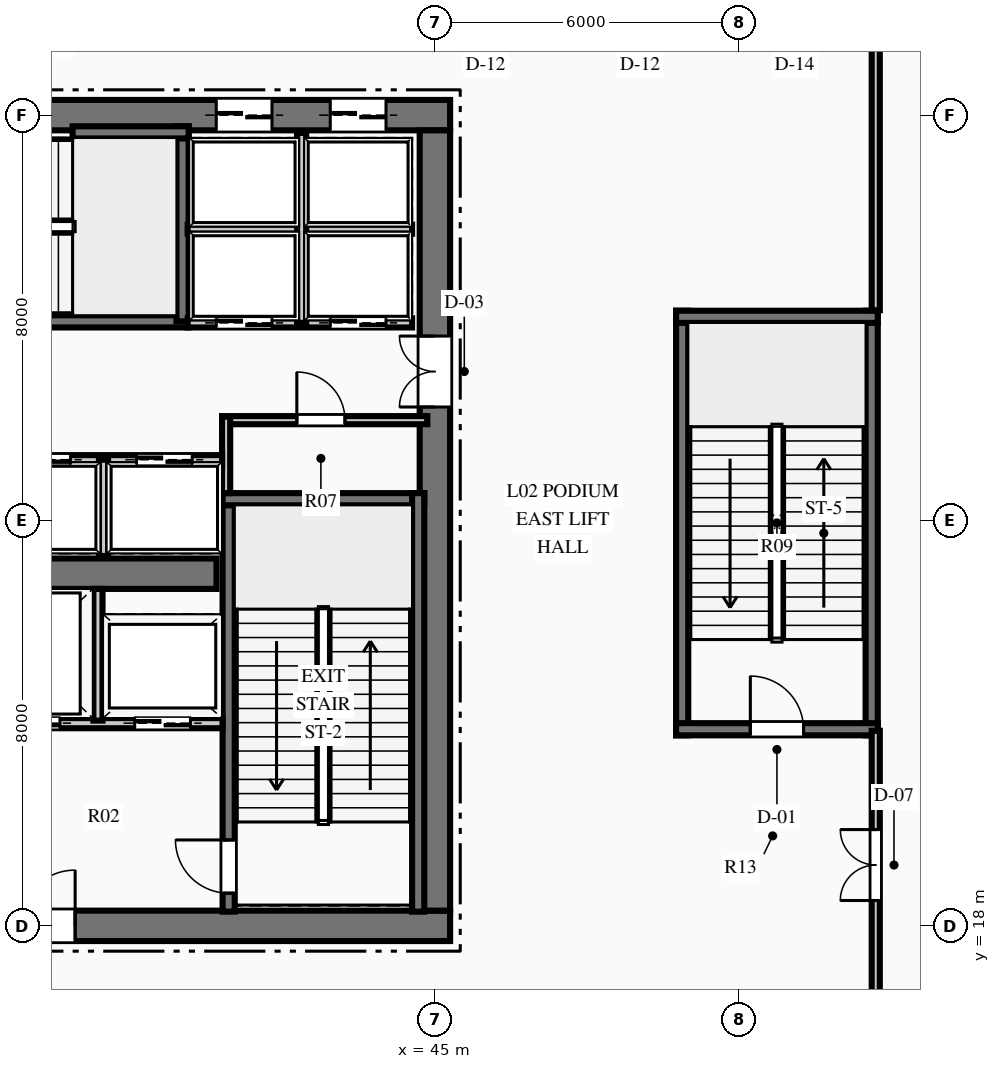
"""IFC4 building model, lengths in metres.
Left out: names, types, materials, properties, quantities, classifications, styles, units other than length and angle.
Written with IfcOpenShell. Run it as: python <this file> out.ifc"""

import sys

from ifc_helpers import new_model, si_unit, direction, frame, frame_2d, origin, place, context, subcontext, project, spatial, rectangle, extrude, element, fill, save


model = new_model("IFC4")
c1 = context("Model", 3, precision=1e-05, world=origin(), true_north=direction((0.0, 1.0)))
c2 = subcontext(c1, "Body", "Model", "MODEL_VIEW")
j1 = project(units=[si_unit("LENGTHUNIT", "METRE"), si_unit("PLANEANGLEUNIT", "RADIAN")], contexts=[c1])
p1 = place(None, origin())
s1 = spatial("IfcSite", under=j1, at=p1, CompositionType="ELEMENT")
p2 = place(p1, origin())
s2 = spatial("IfcBuilding", under=s1, at=p2, CompositionType="ELEMENT")
p3 = place(p2, frame((0.0, 0.0, 11.4)))
s3 = spatial("IfcBuildingStorey", under=s2, at=p3, CompositionType="ELEMENT", Elevation=11.4)
p4 = place(p3, frame((26.7, 18.0, 0.0), z_axis=(0.0, 0.0, 1.0), x_axis=(1.0, 0.0, 0.0)))
e1 = element("IfcWall", 1, at=p4, inside=s3, PredefinedType="SHEAR", context=c2, shape_type="SweptSolid", body=[
    extrude(rectangle(XDim=18.6, YDim=0.6, at=frame_2d((9.3, 0.0))), origin(), (0.0, 0.0, 1.0), 5.4),
])
p5 = place(p4, frame((7.4, 0.0, 0.0)))
e2 = element("IfcOpeningElement", 2, at=p5, cuts=e1, PredefinedType="OPENING", context=c2, shape_type="SweptSolid", body=[
    extrude(rectangle(XDim=1.1, YDim=2.15, at=frame_2d((0.55, 1.075))), frame((0.0, 0.31, 0.0), z_axis=(0.0, -1.0, 0.0), x_axis=(1.0, 0.0, 0.0)), (0.0, 0.0, 1.0), 0.62),
])
p6 = place(p4, frame((10.1, 0.0, 0.0)))
e3 = element("IfcOpeningElement", 3, at=p6, cuts=e1, PredefinedType="OPENING", context=c2, shape_type="SweptSolid", body=[
    extrude(rectangle(XDim=1.1, YDim=2.15, at=frame_2d((0.55, 1.075))), frame((0.0, 0.31, 0.0), z_axis=(0.0, -1.0, 0.0), x_axis=(1.0, 0.0, 0.0)), (0.0, 0.0, 1.0), 0.62),
])
p7 = place(p3, frame((26.7, 34.0, 0.0), z_axis=(0.0, 0.0, 1.0), x_axis=(1.0, 0.0, 0.0)))
e4 = element("IfcWall", 4, at=p7, inside=s3, PredefinedType="SHEAR", context=c2, shape_type="SweptSolid", body=[
    extrude(rectangle(XDim=18.6, YDim=0.6, at=frame_2d((9.3, 0.0))), origin(), (0.0, 0.0, 1.0), 5.4),
])
p8 = place(p7, frame((1.265, 0.0, 0.0)))
e5 = element("IfcOpeningElement", 5, at=p8, cuts=e4, PredefinedType="OPENING", context=c2, shape_type="SweptSolid", body=[
    extrude(rectangle(XDim=1.1, YDim=2.15, at=frame_2d((0.55, 1.075))), frame((0.0, 0.31, 0.0), z_axis=(0.0, -1.0, 0.0), x_axis=(1.0, 0.0, 0.0)), (0.0, 0.0, 1.0), 0.62),
])
p9 = place(p7, frame((3.515, 0.0, 0.0)))
e6 = element("IfcOpeningElement", 6, at=p9, cuts=e4, PredefinedType="OPENING", context=c2, shape_type="SweptSolid", body=[
    extrude(rectangle(XDim=1.1, YDim=2.15, at=frame_2d((0.55, 1.075))), frame((0.0, 0.31, 0.0), z_axis=(0.0, -1.0, 0.0), x_axis=(1.0, 0.0, 0.0)), (0.0, 0.0, 1.0), 0.62),
])
p10 = place(p7, frame((13.985, 0.0, 0.0)))
e7 = element("IfcOpeningElement", 7, at=p10, cuts=e4, PredefinedType="OPENING", context=c2, shape_type="SweptSolid", body=[
    extrude(rectangle(XDim=1.1, YDim=2.15, at=frame_2d((0.55, 1.075))), frame((0.0, 0.31, 0.0), z_axis=(0.0, -1.0, 0.0), x_axis=(1.0, 0.0, 0.0)), (0.0, 0.0, 1.0), 0.62),
])
p11 = place(p7, frame((16.235, 0.0, 0.0)))
e8 = element("IfcOpeningElement", 8, at=p11, cuts=e4, PredefinedType="OPENING", context=c2, shape_type="SweptSolid", body=[
    extrude(rectangle(XDim=1.1, YDim=2.15, at=frame_2d((0.55, 1.075))), frame((0.0, 0.31, 0.0), z_axis=(0.0, -1.0, 0.0), x_axis=(1.0, 0.0, 0.0)), (0.0, 0.0, 1.0), 0.62),
])
p12 = place(p3, frame((45.0, 18.3, 0.0), z_axis=(0.0, 0.0, 1.0), x_axis=(0.0, 1.0, 0.0)))
e9 = element("IfcWall", 9, at=p12, inside=s3, PredefinedType="SHEAR", context=c2, shape_type="SweptSolid", body=[
    extrude(rectangle(XDim=15.4, YDim=0.6, at=frame_2d((7.7, 0.0))), origin(), (0.0, 0.0, 1.0), 5.4),
])
p13 = place(p12, frame((9.94, 0.0, 0.0)))
e10 = element("IfcOpeningElement", 10, at=p13, cuts=e9, PredefinedType="OPENING", context=c2, shape_type="SweptSolid", body=[
    extrude(rectangle(XDim=1.4, YDim=2.2, at=frame_2d((0.7, 1.1))), frame((0.0, 0.31, 0.0), z_axis=(0.0, -1.0, 0.0), x_axis=(1.0, 0.0, 0.0)), (0.0, 0.0, 1.0), 0.62),
])
p14 = place(p3, frame((31.31, 24.95, 0.0), z_axis=(0.0, 0.0, 1.0), x_axis=(1.0, 0.0, 0.0)))
e11 = element("IfcWall", 11, at=p14, inside=s3, PredefinedType="SHEAR", context=c2, shape_type="SweptSolid", body=[
    extrude(rectangle(XDim=9.38, YDim=0.6, at=frame_2d((4.69, 0.0))), origin(), (0.0, 0.0, 1.0), 5.4),
])
p15 = place(p3, frame((40.93, 18.28, 0.0), z_axis=(0.0, 0.0, 1.0), x_axis=(0.0, 1.0, 0.0)))
e12 = element("IfcWall", 12, at=p15, inside=s3, PredefinedType="SHEAR", context=c2, shape_type="SweptSolid", body=[
    extrude(rectangle(XDim=8.26, YDim=0.24, at=frame_2d((4.13, 0.0))), origin(), (0.0, 0.0, 1.0), 5.4),
])
p16 = place(p15, frame((0.365, 0.0, 0.0)))
e13 = element("IfcOpeningElement", 13, at=p16, cuts=e12, PredefinedType="OPENING", context=c2, shape_type="SweptSolid", body=[
    extrude(rectangle(XDim=1.05, YDim=2.15, at=frame_2d((0.525, 1.075))), frame((0.0, 0.13, 0.0), z_axis=(0.0, -1.0, 0.0), x_axis=(1.0, 0.0, 0.0)), (0.0, 0.0, 1.0), 0.26),
])
p17 = place(p3, frame((40.81, 26.42, 0.0), z_axis=(0.0, 0.0, 1.0), x_axis=(1.0, 0.0, 0.0)))
e14 = element("IfcWall", 14, at=p17, inside=s3, PredefinedType="SHEAR", context=c2, shape_type="SweptSolid", body=[
    extrude(rectangle(XDim=3.98, YDim=0.24, at=frame_2d((1.99, 0.0))), origin(), (0.0, 0.0, 1.0), 5.4),
])
p18 = place(p3, frame((44.67, 18.28, 0.0), z_axis=(0.0, 0.0, 1.0), x_axis=(0.0, 1.0, 0.0)))
e15 = element("IfcWall", 15, at=p18, inside=s3, PredefinedType="SHEAR", context=c2, shape_type="SweptSolid", body=[
    extrude(rectangle(XDim=8.26, YDim=0.24, at=frame_2d((4.13, 0.0))), origin(), (0.0, 0.0, 1.0), 5.4),
])
p19 = place(p3, frame((31.76, 29.93, 0.0), z_axis=(0.0, 0.0, 1.0), x_axis=(1.0, 0.0, 0.0)))
e16 = element("IfcWall", 16, at=p19, inside=s3, PredefinedType="SHEAR", context=c2, shape_type="SweptSolid", body=[
    extrude(rectangle(XDim=8.38, YDim=0.24, at=frame_2d((4.19, 0.0))), origin(), (0.0, 0.0, 1.0), 5.4),
])
p20 = place(p19, frame((0.565, 0.0, 0.0)))
e17 = element("IfcOpeningElement", 17, at=p20, cuts=e16, PredefinedType="OPENING", context=c2, shape_type="SweptSolid", body=[
    extrude(rectangle(XDim=1.05, YDim=2.15, at=frame_2d((0.525, 1.075))), frame((0.0, 0.13, 0.0), z_axis=(0.0, -1.0, 0.0), x_axis=(1.0, 0.0, 0.0)), (0.0, 0.0, 1.0), 0.26),
])
p21 = place(p3, frame((40.02, 29.93, 0.0), z_axis=(0.0, 0.0, 1.0), x_axis=(0.0, 1.0, 0.0)))
e18 = element("IfcWall", 18, at=p21, inside=s3, PredefinedType="SHEAR", context=c2, shape_type="SweptSolid", body=[
    extrude(rectangle(XDim=3.85, YDim=0.24, at=frame_2d((1.925, 0.0))), origin(), (0.0, 0.0, 1.0), 5.4),
])
p22 = place(p3, frame((37.85, 33.66, 0.0), z_axis=(0.0, 0.0, 1.0), x_axis=(1.0, 0.0, 0.0)))
e19 = element("IfcWall", 19, at=p22, inside=s3, PredefinedType="SHEAR", context=c2, shape_type="SweptSolid", body=[
    extrude(rectangle(XDim=2.29, YDim=0.24, at=frame_2d((1.145, 0.0))), origin(), (0.0, 0.0, 1.0), 5.4),
])
for number, where, z_axis, x_axis in (
    (20, (49.88, 21.76, 0.0), (0.0, 0.0, 1.0), (0.0, 1.0, 0.0)),
    (21, (53.62, 21.76, 0.0), (0.0, 0.0, 1.0), (0.0, 1.0, 0.0)),
):
    element("IfcWall", number, at=place(p3, frame(where, z_axis=z_axis, x_axis=x_axis)), inside=s3, PredefinedType="SHEAR", context=c2, shape_type="SweptSolid", body=[
        extrude(rectangle(XDim=8.38, YDim=0.24, at=frame_2d((4.19, 0.0))), origin(), (0.0, 0.0, 1.0), 5.4),
    ])
p23 = place(p3, frame((49.76, 21.88, 0.0), z_axis=(0.0, 0.0, 1.0), x_axis=(1.0, 0.0, 0.0)))
e22 = element("IfcWall", 22, at=p23, inside=s3, PredefinedType="SHEAR", context=c2, shape_type="SweptSolid", body=[
    extrude(rectangle(XDim=3.98, YDim=0.24, at=frame_2d((1.99, 0.0))), origin(), (0.0, 0.0, 1.0), 5.4),
])
p24 = place(p23, frame((1.465, 0.0, 0.0)))
e23 = element("IfcOpeningElement", 23, at=p24, cuts=e22, PredefinedType="OPENING", context=c2, shape_type="SweptSolid", body=[
    extrude(rectangle(XDim=1.05, YDim=2.15, at=frame_2d((0.525, 1.075))), frame((0.0, 0.13, 0.0), z_axis=(0.0, -1.0, 0.0), x_axis=(1.0, 0.0, 0.0)), (0.0, 0.0, 1.0), 0.26),
])
p25 = place(p3, frame((49.76, 30.02, 0.0), z_axis=(0.0, 0.0, 1.0), x_axis=(1.0, 0.0, 0.0)))
e24 = element("IfcWall", 24, at=p25, inside=s3, PredefinedType="SHEAR", context=c2, shape_type="SweptSolid", body=[
    extrude(rectangle(XDim=3.98, YDim=0.24, at=frame_2d((1.99, 0.0))), origin(), (0.0, 0.0, 1.0), 5.4),
])
p26 = place(p3, frame((36.12, 22.0, 0.0), z_axis=(0.0, 0.0, 1.0), x_axis=(1.0, 0.0, 0.0)))
e25 = element("IfcWall", 25, at=p26, inside=s3, PredefinedType="PARTITIONING", context=c2, shape_type="SweptSolid", body=[
    extrude(rectangle(XDim=4.69, YDim=0.2, at=frame_2d((2.345, 0.0))), origin(), (0.0, 0.0, 1.0), 5.07),
])
p27 = place(p26, frame((2.955, 0.0, 0.0)))
e26 = element("IfcOpeningElement", 26, at=p27, cuts=e25, PredefinedType="OPENING", context=c2, shape_type="SweptSolid", body=[
    extrude(rectangle(XDim=1.1, YDim=2.15, at=frame_2d((0.55, 1.075))), frame((0.0, 0.11, 0.0), z_axis=(0.0, -1.0, 0.0), x_axis=(1.0, 0.0, 0.0)), (0.0, 0.0, 1.0), 0.22),
])
p28 = place(p26, frame((0.08, 0.0, 0.0)))
e27 = element("IfcOpeningElement", 27, at=p28, cuts=e25, PredefinedType="OPENING", context=c2, shape_type="SweptSolid", body=[
    extrude(rectangle(XDim=1.4, YDim=2.2, at=frame_2d((0.7, 1.1))), frame((0.0, 0.11, 0.0), z_axis=(0.0, -1.0, 0.0), x_axis=(1.0, 0.0, 0.0)), (0.0, 0.0, 1.0), 0.22),
])
p29 = place(p3, frame((38.35, 22.05, 0.0), z_axis=(0.0, 0.0, 1.0), x_axis=(0.0, 1.0, 0.0)))
e28 = element("IfcWall", 28, at=p29, inside=s3, PredefinedType="PARTITIONING", context=c2, shape_type="SweptSolid", body=[
    extrude(rectangle(XDim=2.6, YDim=0.18, at=frame_2d((1.3, 0.0))), origin(), (0.0, 0.0, 1.0), 5.07),
])
p30 = place(p3, frame((40.8, 27.98, 0.0), z_axis=(0.0, 0.0, 1.0), x_axis=(1.0, 0.0, 0.0)))
e29 = element("IfcWall", 29, at=p30, inside=s3, PredefinedType="PARTITIONING", context=c2, shape_type="SweptSolid", body=[
    extrude(rectangle(XDim=4.05, YDim=0.16, at=frame_2d((2.025, 0.0))), origin(), (0.0, 0.0, 1.0), 5.07),
])
p31 = place(p30, frame((1.475, 0.0, 0.0)))
e30 = element("IfcOpeningElement", 30, at=p31, cuts=e29, PredefinedType="OPENING", context=c2, shape_type="SweptSolid", body=[
    extrude(rectangle(XDim=0.95, YDim=2.15, at=frame_2d((0.475, 1.075))), frame((0.0, 0.09, 0.0), z_axis=(0.0, -1.0, 0.0), x_axis=(1.0, 0.0, 0.0)), (0.0, 0.0, 1.0), 0.18),
])
p32 = place(p3, frame((40.88, 26.54, 0.0), z_axis=(0.0, 0.0, 1.0), x_axis=(0.0, 1.0, 0.0)))
e31 = element("IfcWall", 31, at=p32, inside=s3, PredefinedType="PARTITIONING", context=c2, shape_type="SweptSolid", body=[
    extrude(rectangle(XDim=1.51, YDim=0.16, at=frame_2d((0.755, 0.0))), origin(), (0.0, 0.0, 1.0), 5.07),
])
p33 = place(p3, frame((40.12, 29.9, 0.0), z_axis=(0.0, 0.0, 1.0), x_axis=(1.0, 0.0, 0.0)))
e32 = element("IfcWall", 32, at=p33, inside=s3, PredefinedType="PARTITIONING", context=c2, shape_type="SweptSolid", body=[
    extrude(rectangle(XDim=4.43, YDim=0.18, at=frame_2d((2.215, 0.0))), origin(), (0.0, 0.0, 1.0), 5.07),
])
p34 = place(p33, frame((0.565, 0.0, 0.0)))
e33 = element("IfcOpeningElement", 33, at=p34, cuts=e32, PredefinedType="OPENING", context=c2, shape_type="SweptSolid", body=[
    extrude(rectangle(XDim=1.1, YDim=2.15, at=frame_2d((0.55, 1.075))), frame((0.0, 0.1, 0.0), z_axis=(0.0, -1.0, 0.0), x_axis=(1.0, 0.0, 0.0)), (0.0, 0.0, 1.0), 0.2),
])
p35 = place(p33, frame((2.815, 0.0, 0.0)))
e34 = element("IfcOpeningElement", 34, at=p35, cuts=e32, PredefinedType="OPENING", context=c2, shape_type="SweptSolid", body=[
    extrude(rectangle(XDim=1.1, YDim=2.15, at=frame_2d((0.55, 1.075))), frame((0.0, 0.1, 0.0), z_axis=(0.0, -1.0, 0.0), x_axis=(1.0, 0.0, 0.0)), (0.0, 0.0, 1.0), 0.2),
])
p36 = place(p3, frame((40.12, 31.75, 0.0), z_axis=(0.0, 0.0, 1.0), x_axis=(1.0, 0.0, 0.0)))
e35 = element("IfcWall", 35, at=p36, inside=s3, PredefinedType="PARTITIONING", context=c2, shape_type="SweptSolid", body=[
    extrude(rectangle(XDim=4.43, YDim=0.18, at=frame_2d((2.215, 0.0))), origin(), (0.0, 0.0, 1.0), 5.07),
])
p37 = place(p3, frame((42.37, 29.9, 0.0), z_axis=(0.0, 0.0, 1.0), x_axis=(0.0, 1.0, 0.0)))
e36 = element("IfcWall", 36, at=p37, inside=s3, PredefinedType="PARTITIONING", context=c2, shape_type="SweptSolid", body=[
    extrude(rectangle(XDim=3.75, YDim=0.18, at=frame_2d((1.875, 0.0))), origin(), (0.0, 0.0, 1.0), 5.07),
])
p38 = place(p3, frame((31.2, 27.2, 0.0), z_axis=(0.0, 0.0, 1.0), x_axis=(1.0, 0.0, 0.0)))
e37 = element("IfcWall", 37, at=p38, inside=s3, PredefinedType="PARTITIONING", context=c2, shape_type="SweptSolid", body=[
    extrude(rectangle(XDim=9.6, YDim=0.18, at=frame_2d((4.8, 0.0))), origin(), (0.0, 0.0, 1.0), 5.07),
])
p39 = place(p38, frame((0.59, 0.0, 0.0)))
e38 = element("IfcOpeningElement", 38, at=p39, cuts=e37, PredefinedType="OPENING", context=c2, shape_type="SweptSolid", body=[
    extrude(rectangle(XDim=1.1, YDim=2.15, at=frame_2d((0.55, 1.075))), frame((0.0, 0.1, 0.0), z_axis=(0.0, -1.0, 0.0), x_axis=(1.0, 0.0, 0.0)), (0.0, 0.0, 1.0), 0.2),
])
p40 = place(p38, frame((2.99, 0.0, 0.0)))
e39 = element("IfcOpeningElement", 39, at=p40, cuts=e37, PredefinedType="OPENING", context=c2, shape_type="SweptSolid", body=[
    extrude(rectangle(XDim=1.1, YDim=2.15, at=frame_2d((0.55, 1.075))), frame((0.0, 0.1, 0.0), z_axis=(0.0, -1.0, 0.0), x_axis=(1.0, 0.0, 0.0)), (0.0, 0.0, 1.0), 0.2),
])
p41 = place(p38, frame((5.51, 0.0, 0.0)))
e40 = element("IfcOpeningElement", 40, at=p41, cuts=e37, PredefinedType="OPENING", context=c2, shape_type="SweptSolid", body=[
    extrude(rectangle(XDim=1.1, YDim=2.15, at=frame_2d((0.55, 1.075))), frame((0.0, 0.1, 0.0), z_axis=(0.0, -1.0, 0.0), x_axis=(1.0, 0.0, 0.0)), (0.0, 0.0, 1.0), 0.2),
])
p42 = place(p38, frame((7.91, 0.0, 0.0)))
e41 = element("IfcOpeningElement", 41, at=p42, cuts=e37, PredefinedType="OPENING", context=c2, shape_type="SweptSolid", body=[
    extrude(rectangle(XDim=1.1, YDim=2.15, at=frame_2d((0.55, 1.075))), frame((0.0, 0.1, 0.0), z_axis=(0.0, -1.0, 0.0), x_axis=(1.0, 0.0, 0.0)), (0.0, 0.0, 1.0), 0.2),
])
p43 = place(p3, frame((38.46, 25.3, 0.0), z_axis=(0.0, 0.0, 1.0), x_axis=(0.0, 1.0, 0.0)))
e42 = element("IfcWall", 42, at=p43, inside=s3, PredefinedType="PARTITIONING", context=c2, shape_type="SweptSolid", body=[
    extrude(rectangle(XDim=1.9, YDim=0.18, at=frame_2d((0.95, 0.0))), origin(), (0.0, 0.0, 1.0), 5.07),
])
p44 = place(p3, frame((53.7, 15.3, 0.0), z_axis=(0.0, 0.0, 1.0), x_axis=(0.0, 1.0, 0.0)))
e43 = element("IfcWall", 43, at=p44, inside=s3, PredefinedType="PARTITIONING", context=c2, shape_type="SweptSolid", body=[
    extrude(rectangle(XDim=6.55, YDim=0.16, at=frame_2d((3.275, 0.0))), origin(), (0.0, 0.0, 1.0), 5.07),
])
p45 = place(p44, frame((3.2, 0.0, 0.0)))
e44 = element("IfcOpeningElement", 44, at=p45, cuts=e43, PredefinedType="OPENING", context=c2, shape_type="SweptSolid", body=[
    extrude(rectangle(XDim=1.4, YDim=2.2, at=frame_2d((0.7, 1.1))), frame((0.0, 0.09, 0.0), z_axis=(0.0, -1.0, 0.0), x_axis=(1.0, 0.0, 0.0)), (0.0, 0.0, 1.0), 0.18),
])
p46 = place(p3, frame((53.7, 30.15, 0.0), z_axis=(0.0, 0.0, 1.0), x_axis=(0.0, 1.0, 0.0)))
e45 = element("IfcWall", 45, at=p46, inside=s3, PredefinedType="PARTITIONING", context=c2, shape_type="SweptSolid", body=[
    extrude(rectangle(XDim=6.55, YDim=0.16, at=frame_2d((3.275, 0.0))), origin(), (0.0, 0.0, 1.0), 5.07),
])
p47 = place(p31, origin())
e46 = element("IfcDoor", 46, at=p47, inside=s3, OperationType="SINGLE_SWING_LEFT", PredefinedType="DOOR", context=c2, shape_type="SweptSolid", body=[
    extrude(rectangle(XDim=0.95, YDim=2.15, at=frame_2d((0.475, 1.075))), frame((0.0, 0.025, 0.0), z_axis=(0.0, -1.0, 0.0), x_axis=(1.0, 0.0, 0.0)), (0.0, 0.0, 1.0), 0.05),
])
fill(e30, e46)
p48 = place(p16, origin())
e47 = element("IfcDoor", 47, at=p48, inside=s3, OperationType="SINGLE_SWING_RIGHT", PredefinedType="DOOR", context=c2, shape_type="SweptSolid", body=[
    extrude(rectangle(XDim=1.05, YDim=2.15, at=frame_2d((0.525, 1.075))), frame((0.0, 0.025, 0.0), z_axis=(0.0, -1.0, 0.0), x_axis=(1.0, 0.0, 0.0)), (0.0, 0.0, 1.0), 0.05),
])
fill(e13, e47)
p49 = place(p6, origin())
e48 = element("IfcDoor", 48, at=p49, inside=s3, OperationType="SINGLE_SWING_RIGHT", PredefinedType="DOOR", context=c2, shape_type="SweptSolid", body=[
    extrude(rectangle(XDim=1.1, YDim=2.15, at=frame_2d((0.55, 1.075))), frame((0.0, 0.025, 0.0), z_axis=(0.0, -1.0, 0.0), x_axis=(1.0, 0.0, 0.0)), (0.0, 0.0, 1.0), 0.05),
])
fill(e3, e48)
p50 = place(p13, origin())
e49 = element("IfcDoor", 49, at=p50, inside=s3, OperationType="DOUBLE_DOOR_SINGLE_SWING", PredefinedType="DOOR", context=c2, shape_type="SweptSolid", body=[
    extrude(rectangle(XDim=1.4, YDim=2.2, at=frame_2d((0.7, 1.1))), frame((0.0, 0.025, 0.0), z_axis=(0.0, -1.0, 0.0), x_axis=(1.0, 0.0, 0.0)), (0.0, 0.0, 1.0), 0.05),
])
fill(e10, e49)
p51 = place(p24, origin())
e50 = element("IfcDoor", 50, at=p51, inside=s3, OperationType="SINGLE_SWING_LEFT", PredefinedType="DOOR", context=c2, shape_type="SweptSolid", body=[
    extrude(rectangle(XDim=1.05, YDim=2.15, at=frame_2d((0.525, 1.075))), frame((0.0, 0.025, 0.0), z_axis=(0.0, -1.0, 0.0), x_axis=(1.0, 0.0, 0.0)), (0.0, 0.0, 1.0), 0.05),
])
fill(e23, e50)
p52 = place(p45, origin())
e51 = element("IfcDoor", 51, at=p52, inside=s3, OperationType="DOUBLE_DOOR_SINGLE_SWING", PredefinedType="DOOR", context=c2, shape_type="SweptSolid", body=[
    extrude(rectangle(XDim=1.4, YDim=2.2, at=frame_2d((0.7, 1.1))), frame((0.0, 0.025, 0.0), z_axis=(0.0, -1.0, 0.0), x_axis=(1.0, 0.0, 0.0)), (0.0, 0.0, 1.0), 0.05),
])
fill(e44, e51)
p53 = place(p34, origin())
e52 = element("IfcDoor", 52, at=p53, inside=s3, OperationType="SLIDING_TO_LEFT", PredefinedType="DOOR", context=c2, shape_type="SweptSolid", body=[
    extrude(rectangle(XDim=1.1, YDim=2.15, at=frame_2d((0.55, 1.075))), frame((0.0, 0.025, 0.0), z_axis=(0.0, -1.0, 0.0), x_axis=(1.0, 0.0, 0.0)), (0.0, 0.0, 1.0), 0.05),
])
fill(e33, e52)
p54 = place(p35, origin())
e53 = element("IfcDoor", 53, at=p54, inside=s3, OperationType="SLIDING_TO_LEFT", PredefinedType="DOOR", context=c2, shape_type="SweptSolid", body=[
    extrude(rectangle(XDim=1.1, YDim=2.15, at=frame_2d((0.55, 1.075))), frame((0.0, 0.025, 0.0), z_axis=(0.0, -1.0, 0.0), x_axis=(1.0, 0.0, 0.0)), (0.0, 0.0, 1.0), 0.05),
])
fill(e34, e53)
p55 = place(p10, origin())
e54 = element("IfcDoor", 54, at=p55, inside=s3, OperationType="SLIDING_TO_LEFT", PredefinedType="DOOR", context=c2, shape_type="SweptSolid", body=[
    extrude(rectangle(XDim=1.1, YDim=2.15, at=frame_2d((0.55, 1.075))), frame((0.0, 0.025, 0.0), z_axis=(0.0, -1.0, 0.0), x_axis=(1.0, 0.0, 0.0)), (0.0, 0.0, 1.0), 0.05),
])
fill(e7, e54)
p56 = place(p11, origin())
e55 = element("IfcDoor", 55, at=p56, inside=s3, OperationType="SLIDING_TO_LEFT", PredefinedType="DOOR", context=c2, shape_type="SweptSolid", body=[
    extrude(rectangle(XDim=1.1, YDim=2.15, at=frame_2d((0.55, 1.075))), frame((0.0, 0.025, 0.0), z_axis=(0.0, -1.0, 0.0), x_axis=(1.0, 0.0, 0.0)), (0.0, 0.0, 1.0), 0.05),
])
fill(e8, e55)
p57 = place(p41, origin())
e56 = element("IfcDoor", 56, at=p57, inside=s3, OperationType="SLIDING_TO_LEFT", PredefinedType="DOOR", context=c2, shape_type="SweptSolid", body=[
    extrude(rectangle(XDim=1.1, YDim=2.15, at=frame_2d((0.55, 1.075))), frame((0.0, 0.025, 0.0), z_axis=(0.0, -1.0, 0.0), x_axis=(1.0, 0.0, 0.0)), (0.0, 0.0, 1.0), 0.05),
])
fill(e40, e56)
p58 = place(p42, origin())
e57 = element("IfcDoor", 57, at=p58, inside=s3, OperationType="SLIDING_TO_LEFT", PredefinedType="DOOR", context=c2, shape_type="SweptSolid", body=[
    extrude(rectangle(XDim=1.1, YDim=2.15, at=frame_2d((0.55, 1.075))), frame((0.0, 0.025, 0.0), z_axis=(0.0, -1.0, 0.0), x_axis=(1.0, 0.0, 0.0)), (0.0, 0.0, 1.0), 0.05),
])
fill(e41, e57)
p59 = place(p27, origin())
e58 = element("IfcDoor", 58, at=p59, inside=s3, OperationType="SLIDING_TO_LEFT", PredefinedType="DOOR", context=c2, shape_type="SweptSolid", body=[
    extrude(rectangle(XDim=1.1, YDim=2.15, at=frame_2d((0.55, 1.075))), frame((0.0, 0.025, 0.0), z_axis=(0.0, -1.0, 0.0), x_axis=(1.0, 0.0, 0.0)), (0.0, 0.0, 1.0), 0.05),
])
fill(e26, e58)
p60 = place(p28, origin())
e59 = element("IfcDoor", 59, at=p60, inside=s3, OperationType="SLIDING_TO_LEFT", PredefinedType="DOOR", context=c2, shape_type="SweptSolid", body=[
    extrude(rectangle(XDim=1.4, YDim=2.2, at=frame_2d((0.7, 1.1))), frame((0.0, 0.025, 0.0), z_axis=(0.0, -1.0, 0.0), x_axis=(1.0, 0.0, 0.0)), (0.0, 0.0, 1.0), 0.05),
])
fill(e27, e59)
save(model, sys.argv[1])
